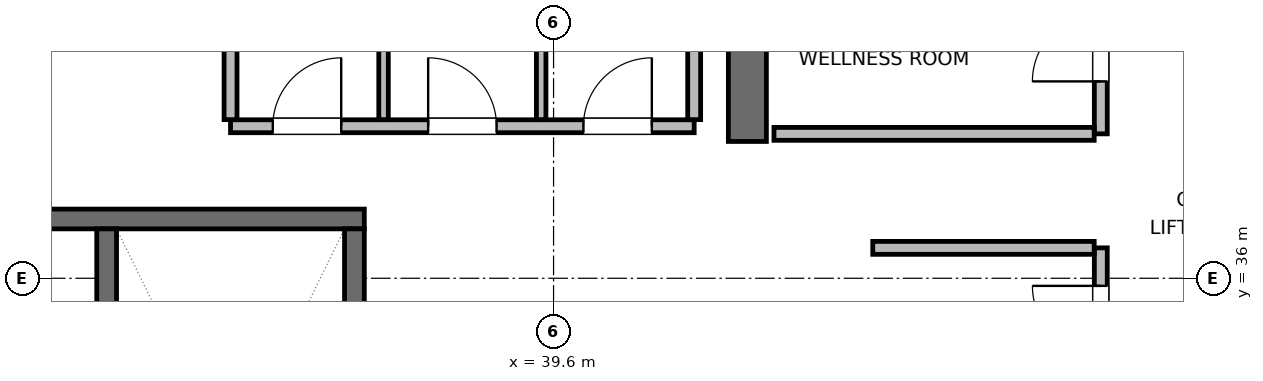
"""IFC4 building model, lengths in metres.
Left out: names, types, materials, properties, quantities, classifications, styles, units other than length and angle.
Written with IfcOpenShell. Run it as: python <this file> out.ifc"""

import sys

from ifc_helpers import new_model, si_unit, direction, frame, frame_2d, origin, place, context, subcontext, project, spatial, rectangle, extrude, element, fill, save


model = new_model("IFC4")
c1 = context("Model", 3, precision=1e-05, world=origin(), true_north=direction((0.0, 1.0)))
c2 = subcontext(c1, "Body", "Model", "MODEL_VIEW")
j1 = project(units=[si_unit("LENGTHUNIT", "METRE"), si_unit("PLANEANGLEUNIT", "RADIAN")], contexts=[c1])
p1 = place(None, origin())
s1 = spatial("IfcSite", under=j1, at=p1, CompositionType="ELEMENT")
p2 = place(p1, origin())
s2 = spatial("IfcBuilding", under=s1, at=p2, CompositionType="ELEMENT")
p3 = place(p2, frame((0.0, 0.0, 342.0)))
s3 = spatial("IfcBuildingStorey", under=s2, at=p3, CompositionType="ELEMENT", Elevation=342.0)
p4 = place(p3, frame((42.15, 37.8, 0.0), z_axis=(0.0, 0.0, 1.0), x_axis=(0.0, 1.0, 0.0)))
e1 = element("IfcWall", 1, at=p4, inside=s3, PredefinedType="SHEAR", context=c2, shape_type="SweptSolid", body=[
    extrude(rectangle(XDim=6.35, YDim=0.5, at=frame_2d((3.175, 0.0))), origin(), (0.0, 0.0, 1.0), 4.5),
])
p5 = place(p3, frame((32.9, 36.78, 0.0), z_axis=(0.0, 0.0, 1.0), x_axis=(1.0, 0.0, 0.0)))
e2 = element("IfcWall", 2, at=p5, inside=s3, PredefinedType="SHEAR", context=c2, shape_type="SweptSolid", body=[
    extrude(rectangle(XDim=4.21, YDim=0.26, at=frame_2d((2.105, 0.0))), origin(), (0.0, 0.0, 1.0), 4.5),
])
p6 = place(p3, frame((33.72, 29.05, 0.0), z_axis=(0.0, 0.0, 1.0), x_axis=(0.0, 1.0, 0.0)))
e3 = element("IfcWall", 3, at=p6, inside=s3, PredefinedType="SHEAR", context=c2, shape_type="SweptSolid", body=[
    extrude(rectangle(XDim=7.6, YDim=0.26, at=frame_2d((3.8, 0.0))), origin(), (0.0, 0.0, 1.0), 4.5),
])
p7 = place(p3, frame((36.98, 29.05, 0.0), z_axis=(0.0, 0.0, 1.0), x_axis=(0.0, 1.0, 0.0)))
e4 = element("IfcWall", 4, at=p7, inside=s3, PredefinedType="SHEAR", context=c2, shape_type="SweptSolid", body=[
    extrude(rectangle(XDim=7.6, YDim=0.26, at=frame_2d((3.8, 0.0))), origin(), (0.0, 0.0, 1.0), 4.5),
])
p8 = place(p7, frame((0.3, 0.0, 0.0)))
e5 = element("IfcOpeningElement", 5, at=p8, cuts=e4, PredefinedType="OPENING", context=c2, shape_type="SweptSolid", body=[
    extrude(rectangle(XDim=1.0, YDim=2.04, at=frame_2d((0.5, 1.02))), frame((0.0, 0.14, 0.0), z_axis=(0.0, -1.0, 0.0), x_axis=(1.0, 0.0, 0.0)), (0.0, 0.0, 1.0), 0.28),
])
p9 = place(p3, frame((35.35, 38.0, 0.0), z_axis=(0.0, 0.0, 1.0), x_axis=(1.0, 0.0, 0.0)))
e6 = element("IfcWall", 6, at=p9, inside=s3, PredefinedType="PARTITIONING", context=c2, shape_type="SweptSolid", body=[
    extrude(rectangle(XDim=6.1, YDim=0.17, at=frame_2d((3.05, 0.0))), origin(), (0.0, 0.0, 1.0), 4.28),
])
p10 = place(p9, frame((0.556, 0.0, 0.0)))
e7 = element("IfcOpeningElement", 7, at=p10, cuts=e6, PredefinedType="OPENING", context=c2, shape_type="SweptSolid", body=[
    extrude(rectangle(XDim=0.9, YDim=2.02, at=frame_2d((0.45, 1.01))), frame((0.0, 0.095, 0.0), z_axis=(0.0, -1.0, 0.0), x_axis=(1.0, 0.0, 0.0)), (0.0, 0.0, 1.0), 0.19),
])
p11 = place(p9, frame((2.6, 0.0, 0.0)))
e8 = element("IfcOpeningElement", 8, at=p11, cuts=e6, PredefinedType="OPENING", context=c2, shape_type="SweptSolid", body=[
    extrude(rectangle(XDim=0.9, YDim=2.02, at=frame_2d((0.45, 1.01))), frame((0.0, 0.095, 0.0), z_axis=(0.0, -1.0, 0.0), x_axis=(1.0, 0.0, 0.0)), (0.0, 0.0, 1.0), 0.19),
])
p12 = place(p9, frame((4.643, 0.0, 0.0)))
e9 = element("IfcOpeningElement", 9, at=p12, cuts=e6, PredefinedType="OPENING", context=c2, shape_type="SweptSolid", body=[
    extrude(rectangle(XDim=0.9, YDim=2.02, at=frame_2d((0.45, 1.01))), frame((0.0, 0.095, 0.0), z_axis=(0.0, -1.0, 0.0), x_axis=(1.0, 0.0, 0.0)), (0.0, 0.0, 1.0), 0.19),
])
p13 = place(p3, frame((35.35, 38.087, 0.0), z_axis=(0.0, 0.0, 1.0), x_axis=(0.0, 1.0, 0.0)))
e10 = element("IfcWall", 10, at=p13, inside=s3, PredefinedType="PARTITIONING", context=c2, shape_type="SweptSolid", body=[
    extrude(rectangle(XDim=1.493, YDim=0.17, at=frame_2d((0.747, 0.0))), origin(), (0.0, 0.0, 1.0), 4.28),
])
p14 = place(p3, frame((41.45, 38.087, 0.0), z_axis=(0.0, 0.0, 1.0), x_axis=(0.0, 1.0, 0.0)))
e11 = element("IfcWall", 11, at=p14, inside=s3, PredefinedType="PARTITIONING", context=c2, shape_type="SweptSolid", body=[
    extrude(rectangle(XDim=2.813, YDim=0.17, at=frame_2d((1.406, 0.0))), origin(), (0.0, 0.0, 1.0), 4.28),
])
for number, where, z_axis, x_axis in (
    (12, (37.363, 38.087, 0.0), (0.0, 0.0, 1.0), (0.0, 1.0, 0.0)),
    (13, (39.437, 38.087, 0.0), (0.0, 0.0, 1.0), (0.0, 1.0, 0.0)),
):
    element("IfcWall", number, at=place(p3, frame(where, z_axis=z_axis, x_axis=x_axis)), inside=s3, PredefinedType="PARTITIONING", context=c2, shape_type="SweptSolid", body=[
        extrude(rectangle(XDim=2.813, YDim=0.125, at=frame_2d((1.406, 0.0))), origin(), (0.0, 0.0, 1.0), 4.28),
    ])
p15 = place(p3, frame((46.8, 32.6, 0.0), z_axis=(0.0, 0.0, 1.0), x_axis=(0.0, 1.0, 0.0)))
e14 = element("IfcWall", 14, at=p15, inside=s3, PredefinedType="PARTITIONING", context=c2, shape_type="SweptSolid", body=[
    extrude(rectangle(XDim=3.8, YDim=0.17, at=frame_2d((1.9, 0.0))), origin(), (0.0, 0.0, 1.0), 4.28),
])
p16 = place(p15, frame((0.5, 0.0, 0.0)))
e15 = element("IfcOpeningElement", 15, at=p16, cuts=e14, PredefinedType="OPENING", context=c2, shape_type="SweptSolid", body=[
    extrude(rectangle(XDim=0.9, YDim=2.02, at=frame_2d((0.45, 1.01))), frame((0.0, 0.095, 0.0), z_axis=(0.0, -1.0, 0.0), x_axis=(1.0, 0.0, 0.0)), (0.0, 0.0, 1.0), 0.19),
])
p17 = place(p15, frame((2.4, 0.0, 0.0)))
e16 = element("IfcOpeningElement", 16, at=p17, cuts=e14, PredefinedType="OPENING", context=c2, shape_type="SweptSolid", body=[
    extrude(rectangle(XDim=0.9, YDim=2.02, at=frame_2d((0.45, 1.01))), frame((0.0, 0.095, 0.0), z_axis=(0.0, -1.0, 0.0), x_axis=(1.0, 0.0, 0.0)), (0.0, 0.0, 1.0), 0.19),
])
p18 = place(p3, frame((43.8, 36.4, 0.0), z_axis=(0.0, 0.0, 1.0), x_axis=(1.0, 0.0, 0.0)))
e17 = element("IfcWall", 17, at=p18, inside=s3, PredefinedType="PARTITIONING", context=c2, shape_type="SweptSolid", body=[
    extrude(rectangle(XDim=2.913, YDim=0.17, at=frame_2d((1.457, 0.0))), origin(), (0.0, 0.0, 1.0), 4.28),
])
p19 = place(p3, frame((46.8, 37.9, 0.0), z_axis=(0.0, 0.0, 1.0), x_axis=(0.0, 1.0, 0.0)))
e18 = element("IfcWall", 18, at=p19, inside=s3, PredefinedType="PARTITIONING", context=c2, shape_type="SweptSolid", body=[
    extrude(rectangle(XDim=6.0, YDim=0.17, at=frame_2d((3.0, 0.0))), origin(), (0.0, 0.0, 1.0), 4.28),
])
p20 = place(p19, frame((0.69, 0.0, 0.0)))
e19 = element("IfcOpeningElement", 19, at=p20, cuts=e18, PredefinedType="OPENING", context=c2, shape_type="SweptSolid", body=[
    extrude(rectangle(XDim=0.9, YDim=2.02, at=frame_2d((0.45, 1.01))), frame((0.0, 0.095, 0.0), z_axis=(0.0, -1.0, 0.0), x_axis=(1.0, 0.0, 0.0)), (0.0, 0.0, 1.0), 0.19),
])
p21 = place(p19, frame((3.69, 0.0, 0.0)))
e20 = element("IfcOpeningElement", 20, at=p21, cuts=e18, PredefinedType="OPENING", context=c2, shape_type="SweptSolid", body=[
    extrude(rectangle(XDim=0.9, YDim=2.02, at=frame_2d((0.45, 1.01))), frame((0.0, 0.095, 0.0), z_axis=(0.0, -1.0, 0.0), x_axis=(1.0, 0.0, 0.0)), (0.0, 0.0, 1.0), 0.19),
])
p22 = place(p3, frame((42.5, 37.9, 0.0), z_axis=(0.0, 0.0, 1.0), x_axis=(1.0, 0.0, 0.0)))
e21 = element("IfcWall", 21, at=p22, inside=s3, PredefinedType="PARTITIONING", context=c2, shape_type="SweptSolid", body=[
    extrude(rectangle(XDim=4.213, YDim=0.17, at=frame_2d((2.106, 0.0))), origin(), (0.0, 0.0, 1.0), 4.28),
])
p23 = place(p10, origin())
e22 = element("IfcDoor", 22, at=p23, inside=s3, OperationType="SINGLE_SWING_RIGHT", PredefinedType="DOOR", context=c2, shape_type="SweptSolid", body=[
    extrude(rectangle(XDim=0.9, YDim=2.02, at=frame_2d((0.45, 1.01))), frame((0.0, 0.025, 0.0), z_axis=(0.0, -1.0, 0.0), x_axis=(1.0, 0.0, 0.0)), (0.0, 0.0, 1.0), 0.05),
])
fill(e7, e22)
p24 = place(p11, origin())
e23 = element("IfcDoor", 23, at=p24, inside=s3, OperationType="SINGLE_SWING_LEFT", PredefinedType="DOOR", context=c2, shape_type="SweptSolid", body=[
    extrude(rectangle(XDim=0.9, YDim=2.02, at=frame_2d((0.45, 1.01))), frame((0.0, 0.025, 0.0), z_axis=(0.0, -1.0, 0.0), x_axis=(1.0, 0.0, 0.0)), (0.0, 0.0, 1.0), 0.05),
])
fill(e8, e23)
p25 = place(p12, origin())
e24 = element("IfcDoor", 24, at=p25, inside=s3, OperationType="SINGLE_SWING_RIGHT", PredefinedType="DOOR", context=c2, shape_type="SweptSolid", body=[
    extrude(rectangle(XDim=0.9, YDim=2.02, at=frame_2d((0.45, 1.01))), frame((0.0, 0.025, 0.0), z_axis=(0.0, -1.0, 0.0), x_axis=(1.0, 0.0, 0.0)), (0.0, 0.0, 1.0), 0.05),
])
fill(e9, e24)
p26 = place(p17, origin())
e25 = element("IfcDoor", 25, at=p26, inside=s3, OperationType="SINGLE_SWING_RIGHT", PredefinedType="DOOR", context=c2, shape_type="SweptSolid", body=[
    extrude(rectangle(XDim=0.9, YDim=2.02, at=frame_2d((0.45, 1.01))), frame((0.0, 0.025, 0.0), z_axis=(0.0, -1.0, 0.0), x_axis=(1.0, 0.0, 0.0)), (0.0, 0.0, 1.0), 0.05),
])
fill(e16, e25)
p27 = place(p20, origin())
e26 = element("IfcDoor", 26, at=p27, inside=s3, OperationType="SINGLE_SWING_LEFT", PredefinedType="DOOR", context=c2, shape_type="SweptSolid", body=[
    extrude(rectangle(XDim=0.9, YDim=2.02, at=frame_2d((0.45, 1.01))), frame((0.0, 0.025, 0.0), z_axis=(0.0, -1.0, 0.0), x_axis=(1.0, 0.0, 0.0)), (0.0, 0.0, 1.0), 0.05),
])
fill(e19, e26)
save(model, sys.argv[1])
